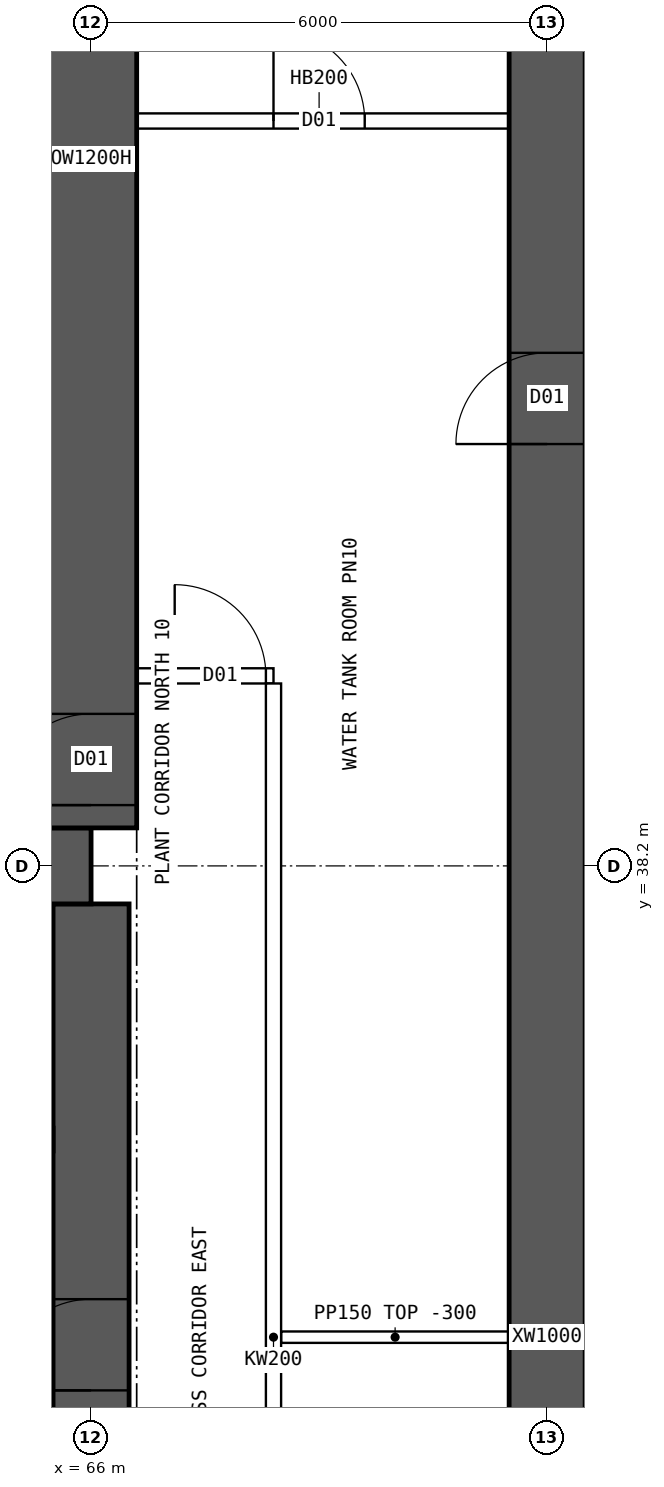
"""IFC4 building model, lengths in metres.
Left out: names, types, materials, properties, quantities, classifications, styles, units other than length and angle.
Written with IfcOpenShell. Run it as: python <this file> out.ifc"""

import sys

from ifc_helpers import new_model, si_unit, direction, frame, frame_2d, origin, place, context, subcontext, project, spatial, rectangle, extrude, element, fill, save


model = new_model("IFC4")
c1 = context("Model", 3, precision=1e-05, world=origin(), true_north=direction((0.0, 1.0)))
c2 = subcontext(c1, "Body", "Model", "MODEL_VIEW")
j1 = project(units=[si_unit("LENGTHUNIT", "METRE"), si_unit("PLANEANGLEUNIT", "RADIAN")], contexts=[c1])
p1 = place(None, origin())
s1 = spatial("IfcSite", under=j1, at=p1, CompositionType="ELEMENT")
p2 = place(p1, origin())
s2 = spatial("IfcBuilding", under=s1, at=p2, CompositionType="ELEMENT")
p3 = place(p2, frame((0.0, 0.0, 68.95)))
s3 = spatial("IfcBuildingStorey", under=s2, at=p3, CompositionType="ELEMENT", Elevation=68.95)
p4 = place(p3, frame((18.0, 38.2, 0.0), z_axis=(0.0, 0.0, 1.0), x_axis=(1.0, 0.0, 0.0)))
e1 = element("IfcWall", 1, at=p4, inside=s3, PredefinedType="SHEAR", context=c2, shape_type="SweptSolid", body=[
    extrude(rectangle(XDim=48.0, YDim=1.0, at=frame_2d((24.0, 0.0))), origin(), (0.0, 0.0, 1.0), 7.2),
])
p5 = place(p3, frame((66.0, 26.3, 0.0), z_axis=(0.0, 0.0, 1.0), x_axis=(0.0, 1.0, 0.0)))
e2 = element("IfcWall", 2, at=p5, inside=s3, PredefinedType="SHEAR", context=c2, shape_type="SweptSolid", body=[
    extrude(rectangle(XDim=11.4, YDim=1.0, at=frame_2d((5.7, 0.0))), origin(), (0.0, 0.0, 1.0), 7.2),
])
p6 = place(p5, frame((5.0, 0.0, 0.0)))
e3 = element("IfcOpeningElement", 3, at=p6, cuts=e2, PredefinedType="OPENING", context=c2, shape_type="SweptSolid", body=[
    extrude(rectangle(XDim=1.2, YDim=2.1, at=frame_2d((0.6, 1.05))), frame((0.0, 0.51, 0.0), z_axis=(0.0, -1.0, 0.0), x_axis=(1.0, 0.0, 0.0)), (0.0, 0.0, 1.0), 1.02),
])
p7 = place(p3, frame((66.0, 38.7, 0.0), z_axis=(0.0, 0.0, 1.0), x_axis=(0.0, 1.0, 0.0)))
e4 = element("IfcWall", 4, at=p7, inside=s3, PredefinedType="SHEAR", context=c2, shape_type="SweptSolid", body=[
    extrude(rectangle(XDim=17.6, YDim=1.2, at=frame_2d((8.8, 0.0))), origin(), (0.0, 0.0, 1.0), 7.2),
])
p8 = place(p7, frame((0.3, 0.0, 0.0)))
e5 = element("IfcOpeningElement", 5, at=p8, cuts=e4, PredefinedType="OPENING", context=c2, shape_type="SweptSolid", body=[
    extrude(rectangle(XDim=1.2, YDim=2.1, at=frame_2d((0.6, 1.05))), frame((0.0, 0.61, 0.0), z_axis=(0.0, -1.0, 0.0), x_axis=(1.0, 0.0, 0.0)), (0.0, 0.0, 1.0), 1.22),
])
p9 = place(p3, frame((72.0, 7.7, 0.0), z_axis=(0.0, 0.0, 1.0), x_axis=(0.0, 1.0, 0.0)))
e6 = element("IfcWall", 6, at=p9, inside=s3, PredefinedType="SHEAR", context=c2, shape_type="SweptSolid", body=[
    extrude(rectangle(XDim=48.6, YDim=1.0, at=frame_2d((24.3, 0.0))), origin(), (0.0, 0.0, 1.0), 7.2),
])
p10 = place(p9, frame((3.85, 0.0, 0.0)))
e7 = element("IfcOpeningElement", 7, at=p10, cuts=e6, PredefinedType="OPENING", context=c2, shape_type="SweptSolid", body=[
    extrude(rectangle(XDim=1.2, YDim=2.1, at=frame_2d((0.6, 1.05))), frame((0.0, 0.51, 0.0), z_axis=(0.0, -1.0, 0.0), x_axis=(1.0, 0.0, 0.0)), (0.0, 0.0, 1.0), 1.02),
])
p11 = place(p9, frame((11.35, 0.0, 0.0)))
e8 = element("IfcOpeningElement", 8, at=p11, cuts=e6, PredefinedType="OPENING", context=c2, shape_type="SweptSolid", body=[
    extrude(rectangle(XDim=1.2, YDim=2.1, at=frame_2d((0.6, 1.05))), frame((0.0, 0.51, 0.0), z_axis=(0.0, -1.0, 0.0), x_axis=(1.0, 0.0, 0.0)), (0.0, 0.0, 1.0), 1.02),
])
p12 = place(p9, frame((43.55, 0.0, 0.0)))
e9 = element("IfcOpeningElement", 9, at=p12, cuts=e6, PredefinedType="OPENING", context=c2, shape_type="SweptSolid", body=[
    extrude(rectangle(XDim=1.2, YDim=2.1, at=frame_2d((0.6, 1.05))), frame((0.0, 0.51, 0.0), z_axis=(0.0, -1.0, 0.0), x_axis=(1.0, 0.0, 0.0)), (0.0, 0.0, 1.0), 1.02),
])
p13 = place(p9, frame((36.05, 0.0, 0.0)))
e10 = element("IfcOpeningElement", 10, at=p13, cuts=e6, PredefinedType="OPENING", context=c2, shape_type="SweptSolid", body=[
    extrude(rectangle(XDim=1.2, YDim=2.1, at=frame_2d((0.6, 1.05))), frame((0.0, 0.51, 0.0), z_axis=(0.0, -1.0, 0.0), x_axis=(1.0, 0.0, 0.0)), (0.0, 0.0, 1.0), 1.02),
])
p14 = place(p3, frame((15.6, 40.7, 0.0), z_axis=(0.0, 0.0, 1.0), x_axis=(1.0, 0.0, 0.0)))
e11 = element("IfcWall", 11, at=p14, inside=s3, PredefinedType="SOLIDWALL", context=c2, shape_type="SweptSolid", body=[
    extrude(rectangle(XDim=52.8, YDim=0.2, at=frame_2d((26.4, 0.0))), origin(), (0.0, 0.0, 1.0), 6.9),
])
p15 = place(p14, frame((0.6, 0.0, 0.0)))
e12 = element("IfcOpeningElement", 12, at=p15, cuts=e11, PredefinedType="OPENING", context=c2, shape_type="SweptSolid", body=[
    extrude(rectangle(XDim=1.2, YDim=2.1, at=frame_2d((0.6, 1.05))), frame((0.0, 0.11, 0.0), z_axis=(0.0, -1.0, 0.0), x_axis=(1.0, 0.0, 0.0)), (0.0, 0.0, 1.0), 0.22),
])
p16 = place(p14, frame((3.5, 0.0, 0.0)))
e13 = element("IfcOpeningElement", 13, at=p16, cuts=e11, PredefinedType="OPENING", context=c2, shape_type="SweptSolid", body=[
    extrude(rectangle(XDim=1.8, YDim=2.4, at=frame_2d((0.9, 1.2))), frame((0.0, 0.11, 0.0), z_axis=(0.0, -1.0, 0.0), x_axis=(1.0, 0.0, 0.0)), (0.0, 0.0, 1.0), 0.22),
])
p17 = place(p14, frame((9.5, 0.0, 0.0)))
e14 = element("IfcOpeningElement", 14, at=p17, cuts=e11, PredefinedType="OPENING", context=c2, shape_type="SweptSolid", body=[
    extrude(rectangle(XDim=1.8, YDim=2.4, at=frame_2d((0.9, 1.2))), frame((0.0, 0.11, 0.0), z_axis=(0.0, -1.0, 0.0), x_axis=(1.0, 0.0, 0.0)), (0.0, 0.0, 1.0), 0.22),
])
p18 = place(p14, frame((15.5, 0.0, 0.0)))
e15 = element("IfcOpeningElement", 15, at=p18, cuts=e11, PredefinedType="OPENING", context=c2, shape_type="SweptSolid", body=[
    extrude(rectangle(XDim=1.8, YDim=2.4, at=frame_2d((0.9, 1.2))), frame((0.0, 0.11, 0.0), z_axis=(0.0, -1.0, 0.0), x_axis=(1.0, 0.0, 0.0)), (0.0, 0.0, 1.0), 0.22),
])
p19 = place(p14, frame((21.5, 0.0, 0.0)))
e16 = element("IfcOpeningElement", 16, at=p19, cuts=e11, PredefinedType="OPENING", context=c2, shape_type="SweptSolid", body=[
    extrude(rectangle(XDim=1.8, YDim=2.4, at=frame_2d((0.9, 1.2))), frame((0.0, 0.11, 0.0), z_axis=(0.0, -1.0, 0.0), x_axis=(1.0, 0.0, 0.0)), (0.0, 0.0, 1.0), 0.22),
])
p20 = place(p14, frame((27.5, 0.0, 0.0)))
e17 = element("IfcOpeningElement", 17, at=p20, cuts=e11, PredefinedType="OPENING", context=c2, shape_type="SweptSolid", body=[
    extrude(rectangle(XDim=1.8, YDim=2.4, at=frame_2d((0.9, 1.2))), frame((0.0, 0.11, 0.0), z_axis=(0.0, -1.0, 0.0), x_axis=(1.0, 0.0, 0.0)), (0.0, 0.0, 1.0), 0.22),
])
p21 = place(p14, frame((33.5, 0.0, 0.0)))
e18 = element("IfcOpeningElement", 18, at=p21, cuts=e11, PredefinedType="OPENING", context=c2, shape_type="SweptSolid", body=[
    extrude(rectangle(XDim=1.8, YDim=2.4, at=frame_2d((0.9, 1.2))), frame((0.0, 0.11, 0.0), z_axis=(0.0, -1.0, 0.0), x_axis=(1.0, 0.0, 0.0)), (0.0, 0.0, 1.0), 0.22),
])
p22 = place(p14, frame((39.5, 0.0, 0.0)))
e19 = element("IfcOpeningElement", 19, at=p22, cuts=e11, PredefinedType="OPENING", context=c2, shape_type="SweptSolid", body=[
    extrude(rectangle(XDim=1.8, YDim=2.4, at=frame_2d((0.9, 1.2))), frame((0.0, 0.11, 0.0), z_axis=(0.0, -1.0, 0.0), x_axis=(1.0, 0.0, 0.0)), (0.0, 0.0, 1.0), 0.22),
])
p23 = place(p14, frame((45.5, 0.0, 0.0)))
e20 = element("IfcOpeningElement", 20, at=p23, cuts=e11, PredefinedType="OPENING", context=c2, shape_type="SweptSolid", body=[
    extrude(rectangle(XDim=1.8, YDim=2.4, at=frame_2d((0.9, 1.2))), frame((0.0, 0.11, 0.0), z_axis=(0.0, -1.0, 0.0), x_axis=(1.0, 0.0, 0.0)), (0.0, 0.0, 1.0), 0.22),
])
p24 = place(p14, frame((51.5, 0.0, 0.0)))
e21 = element("IfcOpeningElement", 21, at=p24, cuts=e11, PredefinedType="OPENING", context=c2, shape_type="SweptSolid", body=[
    extrude(rectangle(XDim=1.2, YDim=2.1, at=frame_2d((0.6, 1.05))), frame((0.0, 0.11, 0.0), z_axis=(0.0, -1.0, 0.0), x_axis=(1.0, 0.0, 0.0)), (0.0, 0.0, 1.0), 0.22),
])
p25 = place(p3, frame((68.4, 23.4, 0.0), z_axis=(0.0, 0.0, 1.0), x_axis=(0.0, 1.0, 0.0)))
e22 = element("IfcWall", 22, at=p25, inside=s3, PredefinedType="SOLIDWALL", context=c2, shape_type="SweptSolid", body=[
    extrude(rectangle(XDim=17.2, YDim=0.2, at=frame_2d((8.6, 0.0))), origin(), (0.0, 0.0, 1.0), 6.9),
])
p26 = place(p3, frame((66.5, 48.0, 0.0), z_axis=(0.0, 0.0, 1.0), x_axis=(1.0, 0.0, 0.0)))
e23 = element("IfcWall", 23, at=p26, inside=s3, PredefinedType="SOLIDWALL", context=c2, shape_type="SweptSolid", body=[
    extrude(rectangle(XDim=5.0, YDim=0.2, at=frame_2d((2.5, 0.0))), origin(), (0.0, 0.0, 1.0), 6.9),
])
p27 = place(p26, frame((1.9, 0.0, 0.0)))
e24 = element("IfcOpeningElement", 24, at=p27, cuts=e23, PredefinedType="OPENING", context=c2, shape_type="SweptSolid", body=[
    extrude(rectangle(XDim=1.2, YDim=2.1, at=frame_2d((0.6, 1.05))), frame((0.0, 0.11, 0.0), z_axis=(0.0, -1.0, 0.0), x_axis=(1.0, 0.0, 0.0)), (0.0, 0.0, 1.0), 0.22),
])
p28 = place(p3, frame((68.5, 32.0, 0.0), z_axis=(0.0, 0.0, 1.0), x_axis=(1.0, 0.0, 0.0)))
e25 = element("IfcWall", 25, at=p28, inside=s3, PredefinedType="PARTITIONING", context=c2, shape_type="SweptSolid", body=[
    extrude(rectangle(XDim=3.0, YDim=0.15, at=frame_2d((1.5, 0.0))), origin(), (0.0, 0.0, 1.0), 6.9),
])
p29 = place(p3, frame((72.5, 32.0, 0.0), z_axis=(0.0, 0.0, 1.0), x_axis=(1.0, 0.0, 0.0)))
e26 = element("IfcWall", 26, at=p29, inside=s3, PredefinedType="PARTITIONING", context=c2, shape_type="SweptSolid", body=[
    extrude(rectangle(XDim=7.595, YDim=0.15, at=frame_2d((3.797, 0.0))), origin(), (0.0, 0.0, 1.0), 6.9),
])
p30 = place(p6, origin())
e27 = element("IfcDoor", 27, at=p30, inside=s3, OperationType="SINGLE_SWING_LEFT", PredefinedType="DOOR", context=c2, shape_type="SweptSolid", body=[
    extrude(rectangle(XDim=1.2, YDim=2.1, at=frame_2d((0.6, 1.05))), frame((0.0, 0.025, 0.0), z_axis=(0.0, -1.0, 0.0), x_axis=(1.0, 0.0, 0.0)), (0.0, 0.0, 1.0), 0.05),
])
fill(e3, e27)
p31 = place(p27, origin())
e28 = element("IfcDoor", 28, at=p31, inside=s3, OperationType="SINGLE_SWING_LEFT", PredefinedType="DOOR", context=c2, shape_type="SweptSolid", body=[
    extrude(rectangle(XDim=1.2, YDim=2.1, at=frame_2d((0.6, 1.05))), frame((0.0, 0.025, 0.0), z_axis=(0.0, -1.0, 0.0), x_axis=(1.0, 0.0, 0.0)), (0.0, 0.0, 1.0), 0.05),
])
fill(e24, e28)
p32 = place(p24, origin())
e29 = element("IfcDoor", 29, at=p32, inside=s3, OperationType="SINGLE_SWING_LEFT", PredefinedType="DOOR", context=c2, shape_type="SweptSolid", body=[
    extrude(rectangle(XDim=1.2, YDim=2.1, at=frame_2d((0.6, 1.05))), frame((0.0, 0.025, 0.0), z_axis=(0.0, -1.0, 0.0), x_axis=(1.0, 0.0, 0.0)), (0.0, 0.0, 1.0), 0.05),
])
fill(e21, e29)
p33 = place(p8, origin())
e30 = element("IfcDoor", 30, at=p33, inside=s3, OperationType="SINGLE_SWING_LEFT", PredefinedType="DOOR", context=c2, shape_type="SweptSolid", body=[
    extrude(rectangle(XDim=1.2, YDim=2.1, at=frame_2d((0.6, 1.05))), frame((0.0, 0.025, 0.0), z_axis=(0.0, -1.0, 0.0), x_axis=(1.0, 0.0, 0.0)), (0.0, 0.0, 1.0), 0.05),
])
fill(e5, e30)
p34 = place(p13, origin())
e31 = element("IfcDoor", 31, at=p34, inside=s3, OperationType="SINGLE_SWING_LEFT", PredefinedType="DOOR", context=c2, shape_type="SweptSolid", body=[
    extrude(rectangle(XDim=1.2, YDim=2.1, at=frame_2d((0.6, 1.05))), frame((0.0, -0.435, 0.0), z_axis=(0.0, -1.0, 0.0), x_axis=(1.0, 0.0, 0.0)), (0.0, 0.0, 1.0), 0.05),
])
fill(e10, e31)
save(model, sys.argv[1])
